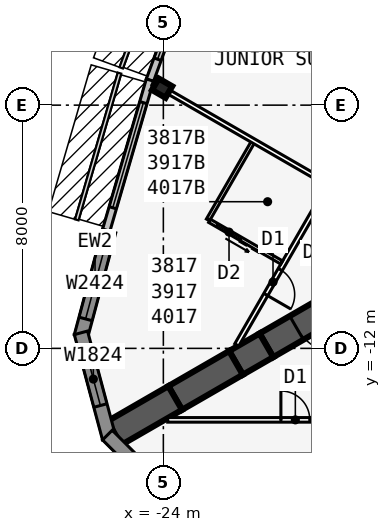
"""IFC4 building model, lengths in metres.
Left out: names, types, materials, properties, quantities, classifications, styles, units other than length and angle.
Written with IfcOpenShell. Run it as: python <this file> out.ifc"""

import sys

from ifc_helpers import new_model, si_unit, direction, frame, frame_2d, origin, origin_2d, place, context, subcontext, project, spatial, polyline, rectangle, i_section, outline, extrude, element, fill, save


model = new_model("IFC4")
c1 = context("Model", 3, precision=1e-05, world=origin(), true_north=direction((0.0, 1.0)))
c2 = subcontext(c1, "Body", "Model", "MODEL_VIEW")
j1 = project(units=[si_unit("LENGTHUNIT", "METRE"), si_unit("PLANEANGLEUNIT", "RADIAN")], contexts=[c1])
p1 = place(None, origin())
s1 = spatial("IfcSite", under=j1, at=p1, CompositionType="ELEMENT")
p2 = place(p1, origin())
s2 = spatial("IfcBuilding", under=s1, at=p2, CompositionType="ELEMENT")
p3 = place(p2, frame((0.0, 0.0, 145.3)))
s3 = spatial("IfcBuildingStorey", under=s2, at=p3, CompositionType="ELEMENT", Elevation=145.3)
p4 = place(p3, frame((-16.5, -9.526, 0.0), z_axis=(0.0, 0.0, 1.0), x_axis=(-0.866031398331, -0.499989616998, 0.0)))
e1 = element("IfcWall", 1, at=p4, inside=s3, PredefinedType="SHEAR", context=c2, shape_type="SweptSolid", body=[
    extrude(rectangle(XDim=4.746, YDim=0.9, at=frame_2d((2.373, 0.0))), origin(), (0.0, 0.0, 1.0), 3.4),
])
p5 = place(p4, frame((1.8, 0.0, 0.0)))
e2 = element("IfcOpeningElement", 2, at=p5, cuts=e1, PredefinedType="OPENING", context=c2, shape_type="SweptSolid", body=[
    extrude(rectangle(XDim=1.8, YDim=2.13, at=frame_2d((0.9, 1.065))), frame((0.0, 0.46, 0.0), z_axis=(0.0, -1.0, 0.0), x_axis=(1.0, 0.0, 0.0)), (0.0, 0.0, 1.0), 0.92),
])
p6 = place(p3, frame((-20.61, -11.899, 0.0), z_axis=(0.0, 0.0, 1.0), x_axis=(-0.866009537788, -0.500027479704, 0.0)))
e3 = element("IfcWall", 3, at=p6, inside=s3, PredefinedType="SHEAR", context=c2, shape_type="SweptSolid", body=[
    extrude(rectangle(XDim=1.155, YDim=0.9, at=frame_2d((0.577, 0.0))), origin(), (0.0, 0.0, 1.0), 3.4),
])
for number, where, z_axis, x_axis in (
    (4, (-21.61, -12.477, 0.0), (0.0, 0.0, 1.0), (-0.866, -0.5, 0.0)),
    (5, (-23.61, -13.631, 0.0), (0.0, 0.0, 1.0), (-0.866, -0.5, 0.0)),
):
    element("IfcWall", number, at=place(p3, frame(where, z_axis=z_axis, x_axis=x_axis)), inside=s3, PredefinedType="SHEAR", context=c2, shape_type="SweptSolid", body=[
        extrude(rectangle(XDim=2.309, YDim=0.9, at=frame_2d((1.155, 0.0))), origin(), (0.0, 0.0, 1.0), 3.4),
    ])
p7 = place(p3, frame((-24.041, -3.44, 0.0), z_axis=(0.0, 0.0, 1.0), x_axis=(-0.5, -0.866025403784, 0.0)))
e6 = element("IfcColumn", 6, at=p7, inside=s3, PredefinedType="COLUMN", context=c2, shape_type="SweptSolid", body=[
    extrude(i_section(OverallWidth=0.437, OverallDepth=0.513, WebThickness=0.061, FlangeThickness=0.097, at=origin_2d()), origin(), (0.0, 0.0, 1.0), 3.4),
])
p8 = place(p3, frame((-22.701, 1.584, 0.0), z_axis=(0.0, 0.0, 1.0), x_axis=(-0.343225593282, -0.939252996863, 0.0)))
e7 = element("IfcWall", 7, at=p8, inside=s3, PredefinedType="STANDARD", context=c2, shape_type="SweptSolid", body=[
    extrude(rectangle(XDim=5.076, YDim=0.25, at=frame_2d((2.538, 0.0))), origin(), (0.0, 0.0, 1.0), 3.235),
])
p9 = place(p8, frame((0.738, 0.0, 0.45)))
e8 = element("IfcOpeningElement", 8, at=p9, cuts=e7, PredefinedType="OPENING", context=c2, shape_type="SweptSolid", body=[
    extrude(rectangle(XDim=3.6, YDim=2.4, at=frame_2d((1.8, 1.2))), frame((0.0, 0.135, 0.0), z_axis=(0.0, -1.0, 0.0), x_axis=(1.0, 0.0, 0.0)), (0.0, 0.0, 1.0), 0.27),
])
p10 = place(p3, frame((-24.441, -3.175, 0.0), z_axis=(0.0, 0.0, 1.0), x_axis=(-0.279528287117, -0.960137457191, 0.0)))
e9 = element("IfcWall", 9, at=p10, inside=s3, PredefinedType="STANDARD", context=c2, shape_type="SweptSolid", body=[
    extrude(rectangle(XDim=5.148, YDim=0.25, at=frame_2d((2.574, 0.0))), origin(), (0.0, 0.0, 1.0), 3.235),
])
p11 = place(p10, frame((0.774, 0.0, 0.45)))
e10 = element("IfcOpeningElement", 10, at=p11, cuts=e9, PredefinedType="OPENING", context=c2, shape_type="SweptSolid", body=[
    extrude(rectangle(XDim=3.6, YDim=2.4, at=frame_2d((1.8, 1.2))), frame((0.0, 0.135, 0.0), z_axis=(0.0, -1.0, 0.0), x_axis=(1.0, 0.0, 0.0)), (0.0, 0.0, 1.0), 0.27),
])
p12 = place(p3, frame((-25.783, -8.141, 0.0), z_axis=(0.0, 0.0, 1.0), x_axis=(-0.258823421857, -0.965924653531, 0.0)))
e11 = element("IfcWall", 11, at=p12, inside=s3, PredefinedType="SOLIDWALL", context=c2, shape_type="SweptSolid", body=[
    extrude(rectangle(XDim=3.586, YDim=0.45, at=frame_2d((1.793, 0.0))), origin(), (0.0, 0.0, 1.0), 3.235),
])
p13 = place(p12, frame((0.593, 0.0, 0.45)))
e12 = element("IfcOpeningElement", 12, at=p13, cuts=e11, PredefinedType="OPENING", context=c2, shape_type="SweptSolid", body=[
    extrude(rectangle(XDim=2.4, YDim=2.4, at=frame_2d((1.2, 1.2))), frame((0.0, 0.235, 0.0), z_axis=(0.0, -1.0, 0.0), x_axis=(1.0, 0.0, 0.0)), (0.0, 0.0, 1.0), 0.47),
])
p14 = place(p3, frame((-26.711, -11.489, 0.0), z_axis=(0.0, 0.0, 1.0), x_axis=(0.258823421857, -0.965924653531, 0.0)))
e13 = element("IfcWall", 13, at=p14, inside=s3, PredefinedType="SOLIDWALL", context=c2, shape_type="SweptSolid", body=[
    extrude(outline(polyline([(3.586, 0.225), (3.527, 0.225), (3.035, 0.093), (3.0, 0.225), (0.0, 0.225), (0.0, -0.225), (3.586, -0.225), (3.586, 0.225)])), origin(), (0.0, 0.0, 1.0), 3.235),
])
p15 = place(p14, frame((0.675, 0.0, 0.45)))
e14 = element("IfcOpeningElement", 14, at=p15, cuts=e13, PredefinedType="OPENING", context=c2, shape_type="SweptSolid", body=[
    extrude(rectangle(XDim=1.8, YDim=2.4, at=frame_2d((0.9, 1.2))), frame((0.0, 0.235, 0.0), z_axis=(0.0, -1.0, 0.0), x_axis=(1.0, 0.0, 0.0)), (0.0, 0.0, 1.0), 0.47),
])
p16 = place(p3, frame((-25.841, -14.852, 0.0), z_axis=(0.0, 0.0, 1.0), x_axis=(0.707106781187, -0.707106781187, 0.0)))
e15 = element("IfcWall", 15, at=p16, inside=s3, PredefinedType="SOLIDWALL", context=c2, shape_type="SweptSolid", body=[
    extrude(outline(polyline([(3.586, 0.225), (0.586, 0.225), (0.551, 0.093), (0.059, 0.225), (0.0, 0.225), (0.0, -0.225), (3.586, -0.225), (3.586, 0.225)])), origin(), (0.0, 0.0, 1.0), 3.235),
])
p17 = place(p16, frame((1.111, 0.0, 0.45)))
e16 = element("IfcOpeningElement", 16, at=p17, cuts=e15, PredefinedType="OPENING", context=c2, shape_type="SweptSolid", body=[
    extrude(rectangle(XDim=1.8, YDim=2.4, at=frame_2d((0.9, 1.2))), frame((0.0, 0.235, 0.0), z_axis=(0.0, -1.0, 0.0), x_axis=(1.0, 0.0, 0.0)), (0.0, 0.0, 1.0), 0.47),
])
p18 = place(p3, frame((-23.857, -14.351, 0.0), z_axis=(0.0, 0.0, 1.0), x_axis=(1.0, 0.0, 0.0)))
e17 = element("IfcWall", 17, at=p18, inside=s3, PredefinedType="PARTITIONING", context=c2, shape_type="SweptSolid", body=[
    extrude(rectangle(XDim=47.714, YDim=0.15, at=frame_2d((23.857, 0.0))), origin(), (0.0, 0.0, 1.0), 3.235),
])
p19 = place(p18, frame((3.723, 0.0, 0.0)))
e18 = element("IfcOpeningElement", 18, at=p19, cuts=e17, PredefinedType="OPENING", context=c2, shape_type="SweptSolid", body=[
    extrude(rectangle(XDim=0.95, YDim=2.13, at=frame_2d((0.475, 1.065))), frame((0.0, 0.085, 0.0), z_axis=(0.0, -1.0, 0.0), x_axis=(1.0, 0.0, 0.0)), (0.0, 0.0, 1.0), 0.17),
])
p20 = place(p18, frame((17.082, 0.0, 0.0)))
e19 = element("IfcOpeningElement", 19, at=p20, cuts=e17, PredefinedType="OPENING", context=c2, shape_type="SweptSolid", body=[
    extrude(rectangle(XDim=0.95, YDim=2.13, at=frame_2d((0.475, 1.065))), frame((0.0, 0.085, 0.0), z_axis=(0.0, -1.0, 0.0), x_axis=(1.0, 0.0, 0.0)), (0.0, 0.0, 1.0), 0.17),
])
p21 = place(p18, frame((21.482, 0.0, 0.0)))
e20 = element("IfcOpeningElement", 20, at=p21, cuts=e17, PredefinedType="OPENING", context=c2, shape_type="SweptSolid", body=[
    extrude(rectangle(XDim=0.95, YDim=2.13, at=frame_2d((0.475, 1.065))), frame((0.0, 0.085, 0.0), z_axis=(0.0, -1.0, 0.0), x_axis=(1.0, 0.0, 0.0)), (0.0, 0.0, 1.0), 0.17),
])
p22 = place(p18, frame((25.857, 0.0, 0.0)))
e21 = element("IfcOpeningElement", 21, at=p22, cuts=e17, PredefinedType="OPENING", context=c2, shape_type="SweptSolid", body=[
    extrude(rectangle(XDim=1.0, YDim=2.13, at=frame_2d((0.5, 1.065))), frame((0.0, 0.085, 0.0), z_axis=(0.0, -1.0, 0.0), x_axis=(1.0, 0.0, 0.0)), (0.0, 0.0, 1.0), 0.17),
])
p23 = place(p18, frame((31.482, 0.0, 0.0)))
e22 = element("IfcOpeningElement", 22, at=p23, cuts=e17, PredefinedType="OPENING", context=c2, shape_type="SweptSolid", body=[
    extrude(rectangle(XDim=0.95, YDim=2.13, at=frame_2d((0.475, 1.065))), frame((0.0, 0.085, 0.0), z_axis=(0.0, -1.0, 0.0), x_axis=(1.0, 0.0, 0.0)), (0.0, 0.0, 1.0), 0.17),
])
p24 = place(p18, frame((36.482, 0.0, 0.0)))
e23 = element("IfcOpeningElement", 23, at=p24, cuts=e17, PredefinedType="OPENING", context=c2, shape_type="SweptSolid", body=[
    extrude(rectangle(XDim=0.95, YDim=2.13, at=frame_2d((0.475, 1.065))), frame((0.0, 0.085, 0.0), z_axis=(0.0, -1.0, 0.0), x_axis=(1.0, 0.0, 0.0)), (0.0, 0.0, 1.0), 0.17),
])
p25 = place(p18, frame((42.082, 0.0, 0.0)))
e24 = element("IfcOpeningElement", 24, at=p25, cuts=e17, PredefinedType="OPENING", context=c2, shape_type="SweptSolid", body=[
    extrude(rectangle(XDim=0.95, YDim=2.13, at=frame_2d((0.475, 1.065))), frame((0.0, 0.085, 0.0), z_axis=(0.0, -1.0, 0.0), x_axis=(1.0, 0.0, 0.0)), (0.0, 0.0, 1.0), 0.17),
])
p26 = place(p3, frame((-0.5, 24.636, 0.0), z_axis=(0.0, 0.0, 1.0), x_axis=(-0.500001915564, -0.86602429783, 0.0)))
e25 = element("IfcWall", 25, at=p26, inside=s3, PredefinedType="PARTITIONING", context=c2, shape_type="SweptSolid", body=[
    extrude(rectangle(XDim=42.172, YDim=0.15, at=frame_2d((21.086, 0.0))), origin(), (0.0, 0.0, 1.0), 3.235),
])
p27 = place(p26, frame((1.911, 0.0, 0.0)))
e26 = element("IfcOpeningElement", 26, at=p27, cuts=e25, PredefinedType="OPENING", context=c2, shape_type="SweptSolid", body=[
    extrude(rectangle(XDim=0.95, YDim=2.13, at=frame_2d((0.475, 1.065))), frame((0.0, 0.085, 0.0), z_axis=(0.0, -1.0, 0.0), x_axis=(1.0, 0.0, 0.0)), (0.0, 0.0, 1.0), 0.17),
])
p28 = place(p26, frame((9.311, 0.0, 0.0)))
e27 = element("IfcOpeningElement", 27, at=p28, cuts=e25, PredefinedType="OPENING", context=c2, shape_type="SweptSolid", body=[
    extrude(rectangle(XDim=0.95, YDim=2.13, at=frame_2d((0.475, 1.065))), frame((0.0, 0.085, 0.0), z_axis=(0.0, -1.0, 0.0), x_axis=(1.0, 0.0, 0.0)), (0.0, 0.0, 1.0), 0.17),
])
p29 = place(p26, frame((18.111, 0.0, 0.0)))
e28 = element("IfcOpeningElement", 28, at=p29, cuts=e25, PredefinedType="OPENING", context=c2, shape_type="SweptSolid", body=[
    extrude(rectangle(XDim=0.95, YDim=2.13, at=frame_2d((0.475, 1.065))), frame((0.0, 0.085, 0.0), z_axis=(0.0, -1.0, 0.0), x_axis=(1.0, 0.0, 0.0)), (0.0, 0.0, 1.0), 0.17),
])
p30 = place(p26, frame((29.311, 0.0, 0.0)))
e29 = element("IfcOpeningElement", 29, at=p30, cuts=e25, PredefinedType="OPENING", context=c2, shape_type="SweptSolid", body=[
    extrude(rectangle(XDim=0.95, YDim=2.13, at=frame_2d((0.475, 1.065))), frame((0.0, 0.085, 0.0), z_axis=(0.0, -1.0, 0.0), x_axis=(1.0, 0.0, 0.0)), (0.0, 0.0, 1.0), 0.17),
])
p31 = place(p26, frame((39.311, 0.0, 0.0)))
e30 = element("IfcOpeningElement", 30, at=p31, cuts=e25, PredefinedType="OPENING", context=c2, shape_type="SweptSolid", body=[
    extrude(rectangle(XDim=0.95, YDim=2.13, at=frame_2d((0.475, 1.065))), frame((0.0, 0.085, 0.0), z_axis=(0.0, -1.0, 0.0), x_axis=(1.0, 0.0, 0.0)), (0.0, 0.0, 1.0), 0.17),
])
p32 = place(p3, frame((-18.608, -6.577, 0.0), z_axis=(0.0, 0.0, 1.0), x_axis=(-0.866031967744, 0.499988630717, 0.0)))
e31 = element("IfcWall", 31, at=p32, inside=s3, PredefinedType="PARTITIONING", context=c2, shape_type="SweptSolid", body=[
    extrude(rectangle(XDim=6.616, YDim=0.15, at=frame_2d((3.308, 0.0))), origin(), (0.0, 0.0, 1.0), 2.389),
])
p33 = place(p3, frame((-21.033, -5.177, 0.0), z_axis=(0.0, 0.0, 1.0), x_axis=(-0.499990139034, -0.866031096941, 0.0)))
e32 = element("IfcWall", 32, at=p33, inside=s3, PredefinedType="PLUMBINGWALL", context=c2, shape_type="SweptSolid", body=[
    extrude(rectangle(XDim=3.0, YDim=0.12, at=frame_2d((1.5, 0.0))), origin(), (0.0, 0.0, 1.0), 3.235),
])
p34 = place(p3, frame((-20.108, -9.175, 0.0), z_axis=(0.0, 0.0, 1.0), x_axis=(-0.866035715982, 0.499982138324, 0.0)))
e33 = element("IfcWall", 33, at=p34, inside=s3, PredefinedType="PLUMBINGWALL", context=c2, shape_type="SweptSolid", body=[
    extrude(rectangle(XDim=2.74, YDim=0.12, at=frame_2d((1.37, 0.0))), origin(), (0.0, 0.0, 1.0), 3.235),
])
p35 = place(p34, frame((1.55, 0.0, 0.0)))
e34 = element("IfcOpeningElement", 34, at=p35, cuts=e33, PredefinedType="OPENING", context=c2, shape_type="SweptSolid", body=[
    extrude(rectangle(XDim=0.9, YDim=2.13, at=frame_2d((0.45, 1.065))), frame((0.0, 0.07, 0.0), z_axis=(0.0, -1.0, 0.0), x_axis=(1.0, 0.0, 0.0)), (0.0, 0.0, 1.0), 0.14),
])
p36 = place(p9, origin())
e35 = element("IfcWindow", 35, at=p36, inside=s3, PartitioningType="SINGLE_PANEL", PredefinedType="WINDOW", context=c2, shape_type="SweptSolid", body=[
    extrude(rectangle(XDim=3.6, YDim=2.4, at=frame_2d((1.8, 1.2))), frame((0.0, 0.03, 0.0), z_axis=(0.0, -1.0, 0.0), x_axis=(1.0, 0.0, 0.0)), (0.0, 0.0, 1.0), 0.06),
])
fill(e8, e35)
p37 = place(p11, origin())
e36 = element("IfcWindow", 36, at=p37, inside=s3, PartitioningType="SINGLE_PANEL", PredefinedType="WINDOW", context=c2, shape_type="SweptSolid", body=[
    extrude(rectangle(XDim=3.6, YDim=2.4, at=frame_2d((1.8, 1.2))), frame((0.0, 0.03, 0.0), z_axis=(0.0, -1.0, 0.0), x_axis=(1.0, 0.0, 0.0)), (0.0, 0.0, 1.0), 0.06),
])
fill(e10, e36)
p38 = place(p13, origin())
e37 = element("IfcWindow", 37, at=p38, inside=s3, PartitioningType="SINGLE_PANEL", PredefinedType="WINDOW", context=c2, shape_type="SweptSolid", body=[
    extrude(rectangle(XDim=2.4, YDim=2.4, at=frame_2d((1.2, 1.2))), frame((0.0, 0.03, 0.0), z_axis=(0.0, -1.0, 0.0), x_axis=(1.0, 0.0, 0.0)), (0.0, 0.0, 1.0), 0.06),
])
fill(e12, e37)
p39 = place(p15, origin())
e38 = element("IfcWindow", 38, at=p39, inside=s3, PartitioningType="SINGLE_PANEL", PredefinedType="WINDOW", context=c2, shape_type="SweptSolid", body=[
    extrude(rectangle(XDim=1.8, YDim=2.4, at=frame_2d((0.9, 1.2))), frame((0.0, 0.03, 0.0), z_axis=(0.0, -1.0, 0.0), x_axis=(1.0, 0.0, 0.0)), (0.0, 0.0, 1.0), 0.06),
])
fill(e14, e38)
p40 = place(p19, origin())
e39 = element("IfcDoor", 39, at=p40, inside=s3, OperationType="SINGLE_SWING_LEFT", PredefinedType="DOOR", context=c2, shape_type="SweptSolid", body=[
    extrude(rectangle(XDim=0.95, YDim=2.13, at=frame_2d((0.475, 1.065))), frame((0.0, 0.025, 0.0), z_axis=(0.0, -1.0, 0.0), x_axis=(1.0, 0.0, 0.0)), (0.0, 0.0, 1.0), 0.05),
])
fill(e18, e39)
p41 = place(p35, origin())
e40 = element("IfcDoor", 40, at=p41, inside=s3, OperationType="SLIDING_TO_LEFT", PredefinedType="DOOR", context=c2, shape_type="SweptSolid", body=[
    extrude(rectangle(XDim=0.9, YDim=2.13, at=frame_2d((0.45, 1.065))), frame((0.0, 0.025, 0.0), z_axis=(0.0, -1.0, 0.0), x_axis=(1.0, 0.0, 0.0)), (0.0, 0.0, 1.0), 0.05),
])
fill(e34, e40)
p42 = place(p31, origin())
e41 = element("IfcDoor", 41, at=p42, inside=s3, OperationType="SINGLE_SWING_RIGHT", PredefinedType="DOOR", context=c2, shape_type="SweptSolid", body=[
    extrude(rectangle(XDim=0.95, YDim=2.13, at=frame_2d((0.475, 1.065))), frame((0.0, 0.025, 0.0), z_axis=(0.0, -1.0, 0.0), x_axis=(1.0, 0.0, 0.0)), (0.0, 0.0, 1.0), 0.05),
])
fill(e30, e41)
p43 = place(p5, origin())
e42 = element("IfcDoor", 42, at=p43, inside=s3, OperationType="DOUBLE_DOOR_DOUBLE_SWING", PredefinedType="DOOR", context=c2, shape_type="SweptSolid", body=[
    extrude(rectangle(XDim=1.8, YDim=2.13, at=frame_2d((0.9, 1.065))), frame((0.0, 0.025, 0.0), z_axis=(0.0, -1.0, 0.0), x_axis=(1.0, 0.0, 0.0)), (0.0, 0.0, 1.0), 0.05),
])
fill(e2, e42)
save(model, sys.argv[1])
